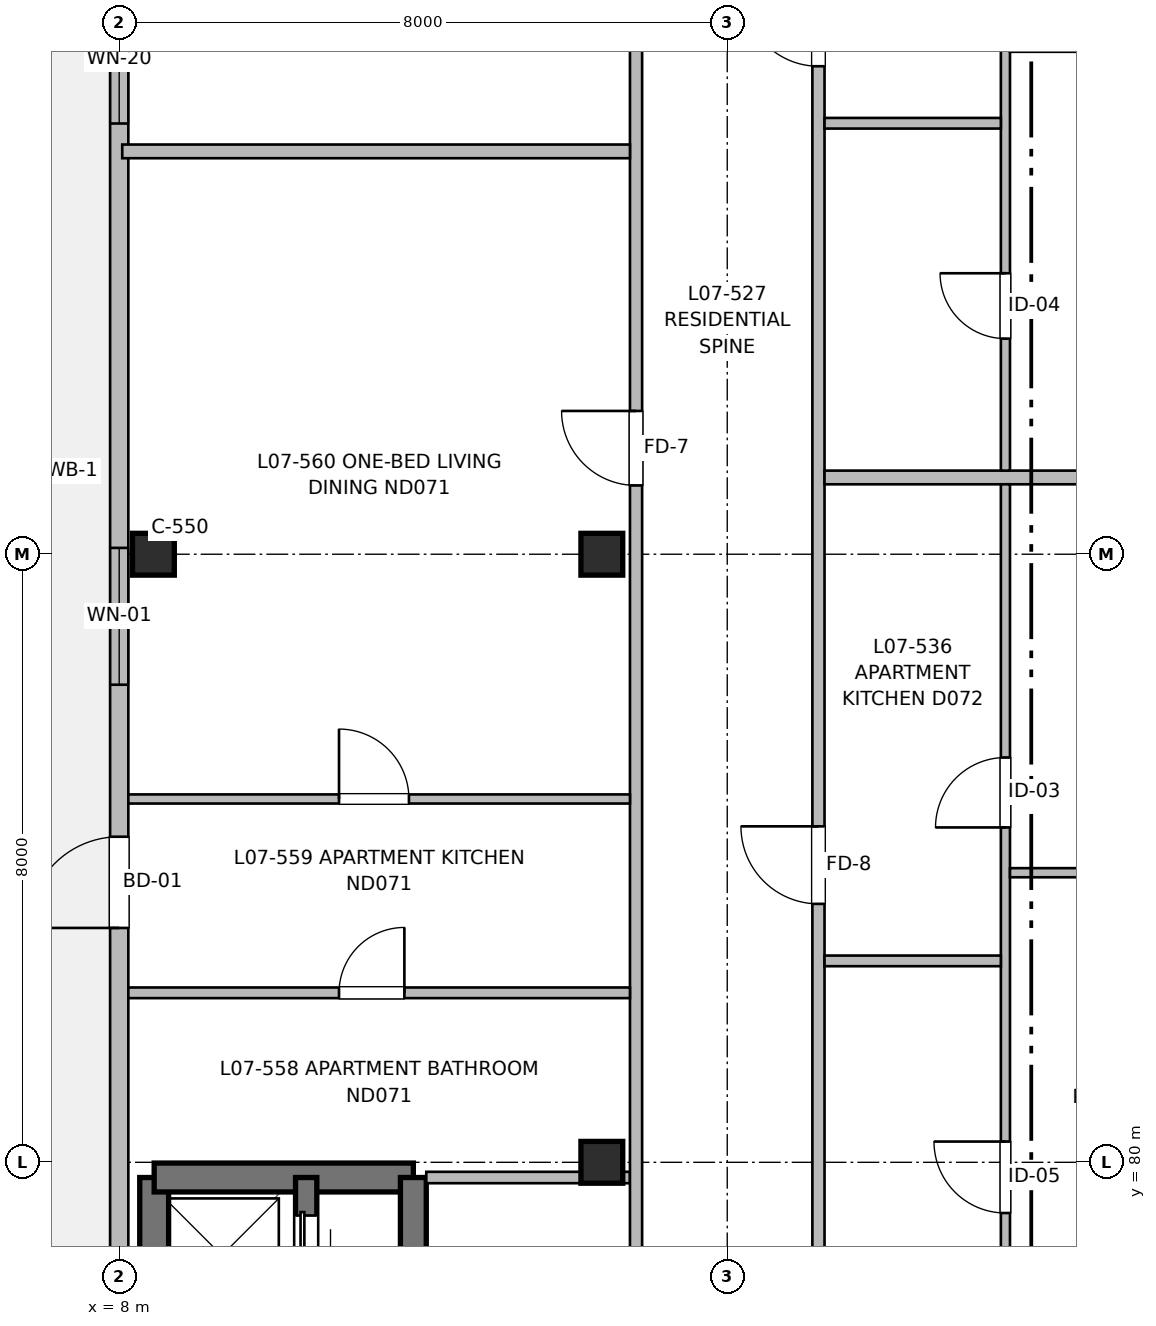
"""IFC4 building model, lengths in metres.
Left out: names, types, materials, properties, quantities, classifications, styles, units other than length and angle.
Written with IfcOpenShell. Run it as: python <this file> out.ifc"""

import sys

from ifc_helpers import new_model, si_unit, direction, frame, frame_2d, origin, origin_2d, place, context, subcontext, project, spatial, rectangle, extrude, element, fill, save


model = new_model("IFC4")
c1 = context("Model", 3, precision=1e-05, world=origin(), true_north=direction((0.0, 1.0)))
c2 = subcontext(c1, "Body", "Model", "MODEL_VIEW")
j1 = project(units=[si_unit("LENGTHUNIT", "METRE"), si_unit("PLANEANGLEUNIT", "RADIAN")], contexts=[c1])
p1 = place(None, origin())
s1 = spatial("IfcSite", under=j1, at=p1, CompositionType="ELEMENT")
p2 = place(p1, origin())
s2 = spatial("IfcBuilding", under=s1, at=p2, CompositionType="ELEMENT")
p3 = place(p2, frame((0.0, 0.0, 23.36)))
s3 = spatial("IfcBuildingStorey", under=s2, at=p3, CompositionType="ELEMENT", Elevation=23.36)
for number, where, z_axis, x_axis in (
    (1, (8.45, 88.0, 0.0), (0.0, 0.0, 1.0), (1.0, 0.0, 0.0)),
    (2, (14.35, 80.0, 0.0), (0.0, 0.0, 1.0), (1.0, 0.0, 0.0)),
    (3, (14.35, 88.0, 0.0), (0.0, 0.0, 1.0), (1.0, 0.0, 0.0)),
):
    element("IfcColumn", number, at=place(p3, frame(where, z_axis=z_axis, x_axis=x_axis)), inside=s3, PredefinedType="COLUMN", context=c2, shape_type="SweptSolid", body=[
        extrude(rectangle(XDim=0.55, YDim=0.55, at=origin_2d()), origin(), (0.0, 0.0, 1.0), 3.2),
    ])
p4 = place(p3, frame((8.46, 67.35, 0.0), z_axis=(0.0, 0.0, 1.0), x_axis=(0.0, 1.0, 0.0)))
e4 = element("IfcWall", 4, at=p4, inside=s3, PredefinedType="SHEAR", context=c2, shape_type="SweptSolid", body=[
    extrude(rectangle(XDim=12.45, YDim=0.38, at=frame_2d((6.225, 0.0))), origin(), (0.0, 0.0, 1.0), 3.2),
])
p5 = place(p4, frame((2.2, 0.0, 0.97)))
e5 = element("IfcOpeningElement", 5, at=p5, cuts=e4, PredefinedType="OPENING", context=c2, shape_type="SweptSolid", body=[
    extrude(rectangle(XDim=0.95, YDim=1.25, at=frame_2d((0.475, 0.625))), frame((0.0, 0.2, 0.0), z_axis=(0.0, -1.0, 0.0), x_axis=(1.0, 0.0, 0.0)), (0.0, 0.0, 1.0), 0.4),
])
p6 = place(p3, frame((8.46, 79.8, 0.0), z_axis=(0.0, 0.0, 1.0), x_axis=(1.0, 0.0, 0.0)))
e6 = element("IfcWall", 6, at=p6, inside=s3, PredefinedType="SHEAR", context=c2, shape_type="SweptSolid", body=[
    extrude(rectangle(XDim=3.41, YDim=0.38, at=frame_2d((1.705, 0.0))), origin(), (0.0, 0.0, 1.0), 3.2),
])
p7 = place(p3, frame((11.87, 79.8, 0.0), z_axis=(0.0, 0.0, 1.0), x_axis=(0.0, -1.0, 0.0)))
e7 = element("IfcWall", 7, at=p7, inside=s3, PredefinedType="SHEAR", context=c2, shape_type="SweptSolid", body=[
    extrude(rectangle(XDim=12.45, YDim=0.34, at=frame_2d((6.225, 0.0))), origin(), (0.0, 0.0, 1.0), 3.2),
])
p8 = place(p7, frame((10.85, 0.0, 0.0)))
e8 = element("IfcOpeningElement", 8, at=p8, cuts=e7, PredefinedType="OPENING", context=c2, shape_type="SweptSolid", body=[
    extrude(rectangle(XDim=1.05, YDim=2.15, at=frame_2d((0.525, 1.075))), frame((0.0, 0.18, 0.0), z_axis=(0.0, -1.0, 0.0), x_axis=(1.0, 0.0, 0.0)), (0.0, 0.0, 1.0), 0.36),
])
p9 = place(p3, frame((10.46, 74.55, 0.0), z_axis=(0.0, 0.0, 1.0), x_axis=(0.0, 1.0, 0.0)))
e9 = element("IfcWall", 9, at=p9, inside=s3, PredefinedType="SHEAR", context=c2, shape_type="SweptSolid", body=[
    extrude(rectangle(XDim=5.25, YDim=0.28, at=frame_2d((2.625, 0.0))), origin(), (0.0, 0.0, 1.0), 3.2),
])
p10 = place(p9, frame((1.15, 0.0, 0.0)))
e10 = element("IfcOpeningElement", 10, at=p10, cuts=e9, PredefinedType="OPENING", context=c2, shape_type="SweptSolid", body=[
    extrude(rectangle(XDim=1.0, YDim=2.15, at=frame_2d((0.5, 1.075))), frame((0.0, 0.15, 0.0), z_axis=(0.0, -1.0, 0.0), x_axis=(1.0, 0.0, 0.0)), (0.0, 0.0, 1.0), 0.3),
])
p11 = place(p9, frame((3.85, 0.0, 0.0)))
e11 = element("IfcOpeningElement", 11, at=p11, cuts=e9, PredefinedType="OPENING", context=c2, shape_type="SweptSolid", body=[
    extrude(rectangle(XDim=0.9, YDim=2.15, at=frame_2d((0.45, 1.075))), frame((0.0, 0.15, 0.0), z_axis=(0.0, -1.0, 0.0), x_axis=(1.0, 0.0, 0.0)), (0.0, 0.0, 1.0), 0.3),
])
p12 = place(p3, frame((8.0, 64.4, 0.0), z_axis=(0.0, 0.0, 1.0), x_axis=(0.0, 1.0, 0.0)))
e12 = element("IfcWall", 12, at=p12, inside=s3, PredefinedType="SOLIDWALL", context=c2, shape_type="SweptSolid", body=[
    extrude(rectangle(XDim=49.4, YDim=0.24, at=frame_2d((24.7, 0.0))), origin(), (0.0, 0.0, 1.0), 2.98),
])
p13 = place(p12, frame((3.792, 0.0, 0.9)))
e13 = element("IfcOpeningElement", 13, at=p13, cuts=e12, PredefinedType="OPENING", context=c2, shape_type="SweptSolid", body=[
    extrude(rectangle(XDim=0.65, YDim=0.95, at=frame_2d((0.325, 0.475))), frame((0.0, 0.13, 0.0), z_axis=(0.0, -1.0, 0.0), x_axis=(1.0, 0.0, 0.0)), (0.0, 0.0, 1.0), 0.26),
])
p14 = place(p12, frame((11.8, 0.0, 0.62)))
e14 = element("IfcOpeningElement", 14, at=p14, cuts=e12, PredefinedType="OPENING", context=c2, shape_type="SweptSolid", body=[
    extrude(rectangle(XDim=1.1, YDim=1.6, at=frame_2d((0.55, 0.8))), frame((0.0, 0.13, 0.0), z_axis=(0.0, -1.0, 0.0), x_axis=(1.0, 0.0, 0.0)), (0.0, 0.0, 1.0), 0.26),
])
p15 = place(p12, frame((18.683, 0.0, 0.0)))
e15 = element("IfcOpeningElement", 15, at=p15, cuts=e12, PredefinedType="OPENING", context=c2, shape_type="SweptSolid", body=[
    extrude(rectangle(XDim=1.2, YDim=2.2, at=frame_2d((0.6, 1.1))), frame((0.0, 0.13, 0.0), z_axis=(0.0, -1.0, 0.0), x_axis=(1.0, 0.0, 0.0)), (0.0, 0.0, 1.0), 0.26),
])
p16 = place(p12, frame((21.883, 0.0, 0.72)))
e16 = element("IfcOpeningElement", 16, at=p16, cuts=e12, PredefinedType="OPENING", context=c2, shape_type="SweptSolid", body=[
    extrude(rectangle(XDim=1.8, YDim=1.5, at=frame_2d((0.9, 0.75))), frame((0.0, 0.13, 0.0), z_axis=(0.0, -1.0, 0.0), x_axis=(1.0, 0.0, 0.0)), (0.0, 0.0, 1.0), 0.26),
])
p17 = place(p12, frame((29.267, 0.0, 0.72)))
e17 = element("IfcOpeningElement", 17, at=p17, cuts=e12, PredefinedType="OPENING", context=c2, shape_type="SweptSolid", body=[
    extrude(rectangle(XDim=1.7, YDim=1.5, at=frame_2d((0.85, 0.75))), frame((0.0, 0.13, 0.0), z_axis=(0.0, -1.0, 0.0), x_axis=(1.0, 0.0, 0.0)), (0.0, 0.0, 1.0), 0.26),
])
p18 = place(p12, frame((32.9, 0.0, 0.57)))
e18 = element("IfcOpeningElement", 18, at=p18, cuts=e12, PredefinedType="OPENING", context=c2, shape_type="SweptSolid", body=[
    extrude(rectangle(XDim=2.3, YDim=1.65, at=frame_2d((1.15, 0.825))), frame((0.0, 0.13, 0.0), z_axis=(0.0, -1.0, 0.0), x_axis=(1.0, 0.0, 0.0)), (0.0, 0.0, 1.0), 0.26),
])
p19 = place(p12, frame((42.758, 0.0, 0.77)))
e19 = element("IfcOpeningElement", 19, at=p19, cuts=e12, PredefinedType="OPENING", context=c2, shape_type="SweptSolid", body=[
    extrude(rectangle(XDim=1.45, YDim=1.45, at=frame_2d((0.725, 0.725))), frame((0.0, 0.13, 0.0), z_axis=(0.0, -1.0, 0.0), x_axis=(1.0, 0.0, 0.0)), (0.0, 0.0, 1.0), 0.26),
])
p20 = place(p3, frame((12.04, 79.8, 0.0), z_axis=(0.0, 0.0, 1.0), x_axis=(1.0, 0.0, 0.0)))
e20 = element("IfcWall", 20, at=p20, inside=s3, PredefinedType="PARTITIONING", context=c2, shape_type="SweptSolid", body=[
    extrude(rectangle(XDim=2.68, YDim=0.15, at=frame_2d((1.34, 0.0))), origin(), (0.0, 0.0, 1.0), 2.935),
])
p21 = place(p3, frame((14.8, 64.56, 0.0), z_axis=(0.0, 0.0, 1.0), x_axis=(0.0, 1.0, 0.0)))
e21 = element("IfcWall", 21, at=p21, inside=s3, PredefinedType="PARTITIONING", context=c2, shape_type="SweptSolid", body=[
    extrude(rectangle(XDim=42.24, YDim=0.16, at=frame_2d((21.12, 0.0))), origin(), (0.0, 0.0, 1.0), 2.935),
])
p22 = place(p21, frame((4.44, 0.0, 0.0)))
e22 = element("IfcOpeningElement", 22, at=p22, cuts=e21, PredefinedType="OPENING", context=c2, shape_type="SweptSolid", body=[
    extrude(rectangle(XDim=1.1, YDim=2.15, at=frame_2d((0.55, 1.075))), frame((0.0, 0.09, 0.0), z_axis=(0.0, -1.0, 0.0), x_axis=(1.0, 0.0, 0.0)), (0.0, 0.0, 1.0), 0.18),
])
p23 = place(p21, frame((10.84, 0.0, 0.0)))
e23 = element("IfcOpeningElement", 23, at=p23, cuts=e21, PredefinedType="OPENING", context=c2, shape_type="SweptSolid", body=[
    extrude(rectangle(XDim=1.6, YDim=2.15, at=frame_2d((0.8, 1.075))), frame((0.0, 0.09, 0.0), z_axis=(0.0, -1.0, 0.0), x_axis=(1.0, 0.0, 0.0)), (0.0, 0.0, 1.0), 0.18),
])
p24 = place(p21, frame((24.345, 0.0, 0.0)))
e24 = element("IfcOpeningElement", 24, at=p24, cuts=e21, PredefinedType="OPENING", context=c2, shape_type="SweptSolid", body=[
    extrude(rectangle(XDim=0.98, YDim=2.15, at=frame_2d((0.49, 1.075))), frame((0.0, 0.09, 0.0), z_axis=(0.0, -1.0, 0.0), x_axis=(1.0, 0.0, 0.0)), (0.0, 0.0, 1.0), 0.18),
])
p25 = place(p21, frame((32.555, 0.0, 0.0)))
e25 = element("IfcOpeningElement", 25, at=p25, cuts=e21, PredefinedType="OPENING", context=c2, shape_type="SweptSolid", body=[
    extrude(rectangle(XDim=0.98, YDim=2.15, at=frame_2d((0.49, 1.075))), frame((0.0, 0.09, 0.0), z_axis=(0.0, -1.0, 0.0), x_axis=(1.0, 0.0, 0.0)), (0.0, 0.0, 1.0), 0.18),
])
p26 = place(p3, frame((17.2, 64.56, 0.0), z_axis=(0.0, 0.0, 1.0), x_axis=(0.0, 1.0, 0.0)))
e26 = element("IfcWall", 26, at=p26, inside=s3, PredefinedType="PARTITIONING", context=c2, shape_type="SweptSolid", body=[
    extrude(rectangle(XDim=42.24, YDim=0.16, at=frame_2d((21.12, 0.0))), origin(), (0.0, 0.0, 1.0), 2.935),
])
p27 = place(p26, frame((6.53, 0.0, 0.0)))
e27 = element("IfcOpeningElement", 27, at=p27, cuts=e26, PredefinedType="OPENING", context=c2, shape_type="SweptSolid", body=[
    extrude(rectangle(XDim=0.98, YDim=2.15, at=frame_2d((0.49, 1.075))), frame((0.0, 0.09, 0.0), z_axis=(0.0, -1.0, 0.0), x_axis=(1.0, 0.0, 0.0)), (0.0, 0.0, 1.0), 0.18),
])
p28 = place(p26, frame((18.84, 0.0, 0.0)))
e28 = element("IfcOpeningElement", 28, at=p28, cuts=e26, PredefinedType="OPENING", context=c2, shape_type="SweptSolid", body=[
    extrude(rectangle(XDim=1.02, YDim=2.15, at=frame_2d((0.51, 1.075))), frame((0.0, 0.09, 0.0), z_axis=(0.0, -1.0, 0.0), x_axis=(1.0, 0.0, 0.0)), (0.0, 0.0, 1.0), 0.18),
])
p29 = place(p26, frame((29.86, 0.0, 0.0)))
e29 = element("IfcOpeningElement", 29, at=p29, cuts=e26, PredefinedType="OPENING", context=c2, shape_type="SweptSolid", body=[
    extrude(rectangle(XDim=0.98, YDim=2.15, at=frame_2d((0.49, 1.075))), frame((0.0, 0.09, 0.0), z_axis=(0.0, -1.0, 0.0), x_axis=(1.0, 0.0, 0.0)), (0.0, 0.0, 1.0), 0.18),
])
p30 = place(p26, frame((38.86, 0.0, 0.0)))
e30 = element("IfcOpeningElement", 30, at=p30, cuts=e26, PredefinedType="OPENING", context=c2, shape_type="SweptSolid", body=[
    extrude(rectangle(XDim=0.98, YDim=2.15, at=frame_2d((0.49, 1.075))), frame((0.0, 0.09, 0.0), z_axis=(0.0, -1.0, 0.0), x_axis=(1.0, 0.0, 0.0)), (0.0, 0.0, 1.0), 0.18),
])
p31 = place(p3, frame((17.28, 89.01, 0.0), z_axis=(0.0, 0.0, 1.0), x_axis=(1.0, 0.0, 0.0)))
e31 = element("IfcWall", 31, at=p31, inside=s3, PredefinedType="PARTITIONING", context=c2, shape_type="SweptSolid", body=[
    extrude(rectangle(XDim=7.15, YDim=0.18, at=frame_2d((3.575, 0.0))), origin(), (0.0, 0.0, 1.0), 2.935),
])
p32 = place(p3, frame((19.66, 77.3, 0.0), z_axis=(0.0, 0.0, 1.0), x_axis=(0.0, 1.0, 0.0)))
e32 = element("IfcWall", 32, at=p32, inside=s3, PredefinedType="PARTITIONING", context=c2, shape_type="SweptSolid", body=[
    extrude(rectangle(XDim=11.62, YDim=0.12, at=frame_2d((5.81, 0.0))), origin(), (0.0, 0.0, 1.0), 2.935),
])
p33 = place(p32, frame((2.033, 0.0, 0.0)))
e33 = element("IfcOpeningElement", 33, at=p33, cuts=e32, PredefinedType="OPENING", context=c2, shape_type="SweptSolid", body=[
    extrude(rectangle(XDim=0.94, YDim=2.1, at=frame_2d((0.47, 1.05))), frame((0.0, 0.07, 0.0), z_axis=(0.0, -1.0, 0.0), x_axis=(1.0, 0.0, 0.0)), (0.0, 0.0, 1.0), 0.14),
])
p34 = place(p32, frame((7.106, 0.0, 0.0)))
e34 = element("IfcOpeningElement", 34, at=p34, cuts=e32, PredefinedType="OPENING", context=c2, shape_type="SweptSolid", body=[
    extrude(rectangle(XDim=0.92, YDim=2.1, at=frame_2d((0.46, 1.05))), frame((0.0, 0.07, 0.0), z_axis=(0.0, -1.0, 0.0), x_axis=(1.0, 0.0, 0.0)), (0.0, 0.0, 1.0), 0.14),
])
p35 = place(p3, frame((17.28, 82.65, 0.0), z_axis=(0.0, 0.0, 1.0), x_axis=(1.0, 0.0, 0.0)))
e35 = element("IfcWall", 35, at=p35, inside=s3, PredefinedType="PARTITIONING", context=c2, shape_type="SweptSolid", body=[
    extrude(rectangle(XDim=2.32, YDim=0.14, at=frame_2d((1.16, 0.0))), origin(), (0.0, 0.0, 1.0), 2.935),
])
p36 = place(p3, frame((19.72, 83.81, 0.0), z_axis=(0.0, 0.0, 1.0), x_axis=(1.0, 0.0, 0.0)))
e36 = element("IfcWall", 36, at=p36, inside=s3, PredefinedType="PARTITIONING", context=c2, shape_type="SweptSolid", body=[
    extrude(rectangle(XDim=4.16, YDim=0.12, at=frame_2d((2.08, 0.0))), origin(), (0.0, 0.0, 1.0), 2.935),
])
p37 = place(p36, frame((1.63, 0.0, 0.0)))
e37 = element("IfcOpeningElement", 37, at=p37, cuts=e36, PredefinedType="OPENING", context=c2, shape_type="SweptSolid", body=[
    extrude(rectangle(XDim=0.9, YDim=2.1, at=frame_2d((0.45, 1.05))), frame((0.0, 0.07, 0.0), z_axis=(0.0, -1.0, 0.0), x_axis=(1.0, 0.0, 0.0)), (0.0, 0.0, 1.0), 0.14),
])
p38 = place(p3, frame((19.66, 89.1, 0.0), z_axis=(0.0, 0.0, 1.0), x_axis=(0.0, 1.0, 0.0)))
e38 = element("IfcWall", 38, at=p38, inside=s3, PredefinedType="PARTITIONING", context=c2, shape_type="SweptSolid", body=[
    extrude(rectangle(XDim=9.94, YDim=0.12, at=frame_2d((4.97, 0.0))), origin(), (0.0, 0.0, 1.0), 2.935),
])
p39 = place(p38, frame((1.737, 0.0, 0.0)))
e39 = element("IfcOpeningElement", 39, at=p39, cuts=e38, PredefinedType="OPENING", context=c2, shape_type="SweptSolid", body=[
    extrude(rectangle(XDim=0.86, YDim=2.1, at=frame_2d((0.43, 1.05))), frame((0.0, 0.07, 0.0), z_axis=(0.0, -1.0, 0.0), x_axis=(1.0, 0.0, 0.0)), (0.0, 0.0, 1.0), 0.14),
])
p40 = place(p38, frame((6.073, 0.0, 0.0)))
e40 = element("IfcOpeningElement", 40, at=p40, cuts=e38, PredefinedType="OPENING", context=c2, shape_type="SweptSolid", body=[
    extrude(rectangle(XDim=0.92, YDim=2.1, at=frame_2d((0.46, 1.05))), frame((0.0, 0.07, 0.0), z_axis=(0.0, -1.0, 0.0), x_axis=(1.0, 0.0, 0.0)), (0.0, 0.0, 1.0), 0.14),
])
p41 = place(p3, frame((17.28, 93.67, 0.0), z_axis=(0.0, 0.0, 1.0), x_axis=(1.0, 0.0, 0.0)))
e41 = element("IfcWall", 41, at=p41, inside=s3, PredefinedType="PARTITIONING", context=c2, shape_type="SweptSolid", body=[
    extrude(rectangle(XDim=2.32, YDim=0.14, at=frame_2d((1.16, 0.0))), origin(), (0.0, 0.0, 1.0), 2.935),
])
p42 = place(p3, frame((8.04, 93.3, 0.0), z_axis=(0.0, 0.0, 1.0), x_axis=(1.0, 0.0, 0.0)))
e42 = element("IfcWall", 42, at=p42, inside=s3, PredefinedType="PARTITIONING", context=c2, shape_type="SweptSolid", body=[
    extrude(rectangle(XDim=6.68, YDim=0.18, at=frame_2d((3.34, 0.0))), origin(), (0.0, 0.0, 1.0), 2.935),
])
p43 = place(p3, frame((8.12, 82.23, 0.0), z_axis=(0.0, 0.0, 1.0), x_axis=(1.0, 0.0, 0.0)))
e43 = element("IfcWall", 43, at=p43, inside=s3, PredefinedType="PARTITIONING", context=c2, shape_type="SweptSolid", body=[
    extrude(rectangle(XDim=6.6, YDim=0.14, at=frame_2d((3.3, 0.0))), origin(), (0.0, 0.0, 1.0), 2.935),
])
p44 = place(p43, frame((2.772, 0.0, 0.0)))
e44 = element("IfcOpeningElement", 44, at=p44, cuts=e43, PredefinedType="OPENING", context=c2, shape_type="SweptSolid", body=[
    extrude(rectangle(XDim=0.86, YDim=2.1, at=frame_2d((0.43, 1.05))), frame((0.0, 0.08, 0.0), z_axis=(0.0, -1.0, 0.0), x_axis=(1.0, 0.0, 0.0)), (0.0, 0.0, 1.0), 0.16),
])
p45 = place(p3, frame((8.12, 84.78, 0.0), z_axis=(0.0, 0.0, 1.0), x_axis=(1.0, 0.0, 0.0)))
e45 = element("IfcWall", 45, at=p45, inside=s3, PredefinedType="PARTITIONING", context=c2, shape_type="SweptSolid", body=[
    extrude(rectangle(XDim=6.6, YDim=0.12, at=frame_2d((3.3, 0.0))), origin(), (0.0, 0.0, 1.0), 2.935),
])
p46 = place(p45, frame((2.772, 0.0, 0.0)))
e46 = element("IfcOpeningElement", 46, at=p46, cuts=e45, PredefinedType="OPENING", context=c2, shape_type="SweptSolid", body=[
    extrude(rectangle(XDim=0.92, YDim=2.1, at=frame_2d((0.46, 1.05))), frame((0.0, 0.07, 0.0), z_axis=(0.0, -1.0, 0.0), x_axis=(1.0, 0.0, 0.0)), (0.0, 0.0, 1.0), 0.14),
])
p47 = place(p11, origin())
e47 = element("IfcDoor", 47, at=p47, inside=s3, OperationType="SLIDING_TO_RIGHT", PredefinedType="DOOR", context=c2, shape_type="SweptSolid", body=[
    extrude(rectangle(XDim=0.9, YDim=2.15, at=frame_2d((0.45, 1.075))), frame((0.0, 0.025, 0.0), z_axis=(0.0, -1.0, 0.0), x_axis=(1.0, 0.0, 0.0)), (0.0, 0.0, 1.0), 0.05),
])
fill(e11, e47)
p48 = place(p15, origin())
e48 = element("IfcDoor", 48, at=p48, inside=s3, OperationType="SINGLE_SWING_LEFT", PredefinedType="DOOR", context=c2, shape_type="SweptSolid", body=[
    extrude(rectangle(XDim=1.2, YDim=2.2, at=frame_2d((0.6, 1.1))), frame((0.0, 0.025, 0.0), z_axis=(0.0, -1.0, 0.0), x_axis=(1.0, 0.0, 0.0)), (0.0, 0.0, 1.0), 0.05),
])
fill(e15, e48)
p49 = place(p16, origin())
e49 = element("IfcWindow", 49, at=p49, inside=s3, PartitioningType="SINGLE_PANEL", PredefinedType="WINDOW", context=c2, shape_type="SweptSolid", body=[
    extrude(rectangle(XDim=1.8, YDim=1.5, at=frame_2d((0.9, 0.75))), frame((0.0, 0.03, 0.0), z_axis=(0.0, -1.0, 0.0), x_axis=(1.0, 0.0, 0.0)), (0.0, 0.0, 1.0), 0.06),
])
fill(e16, e49)
p50 = place(p17, origin())
e50 = element("IfcWindow", 50, at=p50, inside=s3, PartitioningType="SINGLE_PANEL", PredefinedType="WINDOW", context=c2, shape_type="SweptSolid", body=[
    extrude(rectangle(XDim=1.7, YDim=1.5, at=frame_2d((0.85, 0.75))), frame((0.0, 0.03, 0.0), z_axis=(0.0, -1.0, 0.0), x_axis=(1.0, 0.0, 0.0)), (0.0, 0.0, 1.0), 0.06),
])
fill(e17, e50)
p51 = place(p33, origin())
e51 = element("IfcDoor", 51, at=p51, inside=s3, OperationType="SINGLE_SWING_RIGHT", PredefinedType="DOOR", context=c2, shape_type="SweptSolid", body=[
    extrude(rectangle(XDim=0.94, YDim=2.1, at=frame_2d((0.47, 1.05))), frame((0.0, 0.025, 0.0), z_axis=(0.0, -1.0, 0.0), x_axis=(1.0, 0.0, 0.0)), (0.0, 0.0, 1.0), 0.05),
])
fill(e33, e51)
p52 = place(p34, origin())
e52 = element("IfcDoor", 52, at=p52, inside=s3, OperationType="SINGLE_SWING_LEFT", PredefinedType="DOOR", context=c2, shape_type="SweptSolid", body=[
    extrude(rectangle(XDim=0.92, YDim=2.1, at=frame_2d((0.46, 1.05))), frame((0.0, 0.025, 0.0), z_axis=(0.0, -1.0, 0.0), x_axis=(1.0, 0.0, 0.0)), (0.0, 0.0, 1.0), 0.05),
])
fill(e34, e52)
p53 = place(p28, origin())
e53 = element("IfcDoor", 53, at=p53, inside=s3, OperationType="SINGLE_SWING_RIGHT", PredefinedType="DOOR", context=c2, shape_type="SweptSolid", body=[
    extrude(rectangle(XDim=1.02, YDim=2.15, at=frame_2d((0.51, 1.075))), frame((0.0, 0.025, 0.0), z_axis=(0.0, -1.0, 0.0), x_axis=(1.0, 0.0, 0.0)), (0.0, 0.0, 1.0), 0.05),
])
fill(e28, e53)
p54 = place(p39, origin())
e54 = element("IfcDoor", 54, at=p54, inside=s3, OperationType="SINGLE_SWING_RIGHT", PredefinedType="DOOR", context=c2, shape_type="SweptSolid", body=[
    extrude(rectangle(XDim=0.86, YDim=2.1, at=frame_2d((0.43, 1.05))), frame((0.0, 0.025, 0.0), z_axis=(0.0, -1.0, 0.0), x_axis=(1.0, 0.0, 0.0)), (0.0, 0.0, 1.0), 0.05),
])
fill(e39, e54)
p55 = place(p29, origin())
e55 = element("IfcDoor", 55, at=p55, inside=s3, OperationType="SINGLE_SWING_RIGHT", PredefinedType="DOOR", context=c2, shape_type="SweptSolid", body=[
    extrude(rectangle(XDim=0.98, YDim=2.15, at=frame_2d((0.49, 1.075))), frame((0.0, 0.025, 0.0), z_axis=(0.0, -1.0, 0.0), x_axis=(1.0, 0.0, 0.0)), (0.0, 0.0, 1.0), 0.05),
])
fill(e29, e55)
p56 = place(p44, origin())
e56 = element("IfcDoor", 56, at=p56, inside=s3, OperationType="SINGLE_SWING_RIGHT", PredefinedType="DOOR", context=c2, shape_type="SweptSolid", body=[
    extrude(rectangle(XDim=0.86, YDim=2.1, at=frame_2d((0.43, 1.05))), frame((0.0, 0.025, 0.0), z_axis=(0.0, -1.0, 0.0), x_axis=(1.0, 0.0, 0.0)), (0.0, 0.0, 1.0), 0.05),
])
fill(e44, e56)
p57 = place(p46, origin())
e57 = element("IfcDoor", 57, at=p57, inside=s3, OperationType="SINGLE_SWING_LEFT", PredefinedType="DOOR", context=c2, shape_type="SweptSolid", body=[
    extrude(rectangle(XDim=0.92, YDim=2.1, at=frame_2d((0.46, 1.05))), frame((0.0, 0.025, 0.0), z_axis=(0.0, -1.0, 0.0), x_axis=(1.0, 0.0, 0.0)), (0.0, 0.0, 1.0), 0.05),
])
fill(e46, e57)
p58 = place(p24, origin())
e58 = element("IfcDoor", 58, at=p58, inside=s3, OperationType="SINGLE_SWING_RIGHT", PredefinedType="DOOR", context=c2, shape_type="SweptSolid", body=[
    extrude(rectangle(XDim=0.98, YDim=2.15, at=frame_2d((0.49, 1.075))), frame((0.0, 0.025, 0.0), z_axis=(0.0, -1.0, 0.0), x_axis=(1.0, 0.0, 0.0)), (0.0, 0.0, 1.0), 0.05),
])
fill(e24, e58)
save(model, sys.argv[1])
